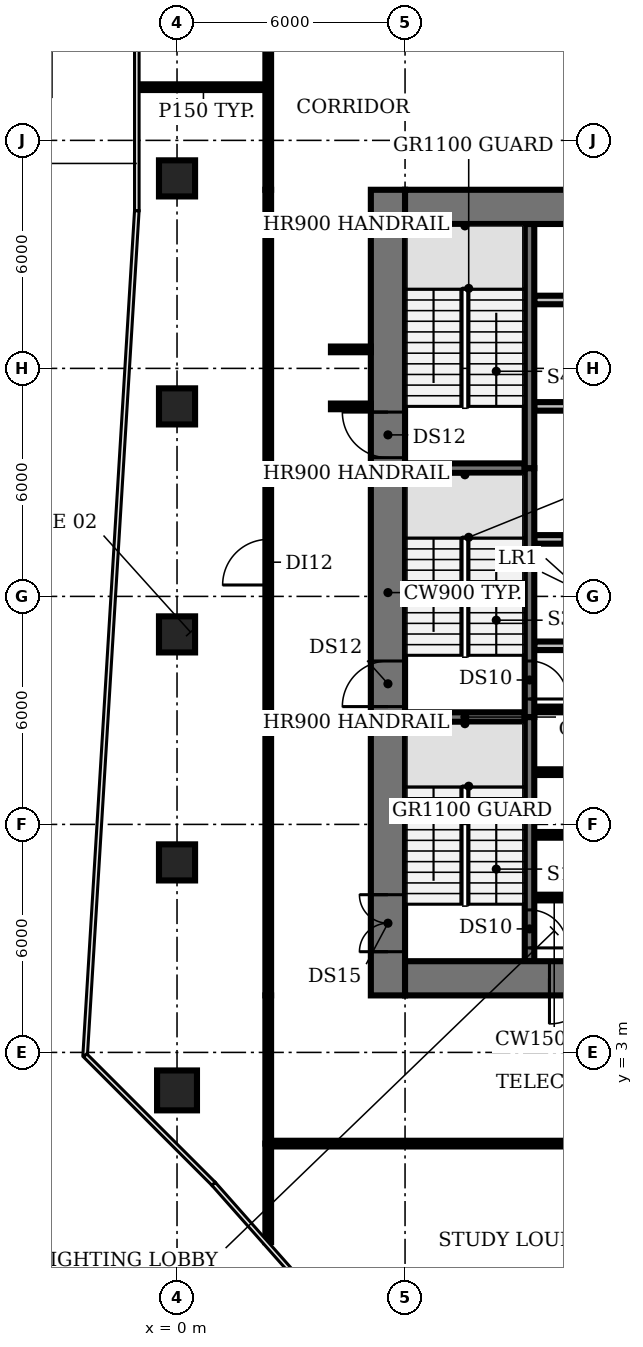
"""IFC4 building model, lengths in metres.
Left out: names, types, materials, properties, quantities, classifications, styles, units other than length and angle.
Written with IfcOpenShell. Run it as: python <this file> out.ifc"""

import sys

from ifc_helpers import new_model, si_unit, direction, frame, frame_2d, origin, origin_2d, place, context, subcontext, project, spatial, rectangle, circle, extrude, element, fill, save


model = new_model("IFC4")
c1 = context("Model", 3, precision=1e-05, world=origin(), true_north=direction((0.0, 1.0)))
c2 = subcontext(c1, "Body", "Model", "MODEL_VIEW")
j1 = project(units=[si_unit("LENGTHUNIT", "METRE"), si_unit("PLANEANGLEUNIT", "RADIAN")], contexts=[c1])
p1 = place(None, origin())
s1 = spatial("IfcSite", under=j1, at=p1, CompositionType="ELEMENT")
p2 = place(p1, origin())
s2 = spatial("IfcBuilding", under=s1, at=p2, CompositionType="ELEMENT")
p3 = place(p2, frame((0.0, 0.0, 37.4)))
s3 = spatial("IfcBuildingStorey", under=s2, at=p3, CompositionType="ELEMENT", Elevation=37.4)
p4 = place(p3, frame((0.0, 2.0, 0.0), z_axis=(0.0, 0.0, 1.0), x_axis=(1.0, 0.0, 0.0)))
e1 = element("IfcColumn", 1, at=p4, inside=s3, PredefinedType="COLUMN", context=c2, shape_type="SweptSolid", body=[
    extrude(circle(Radius=0.525, at=origin_2d()), origin(), (0.0, 0.0, 1.0), 3.85),
])
for number, where, z_axis, x_axis in (
    (2, (0.0, 8.0, 0.0), (0.0, 0.0, 1.0), (1.0, 0.0, 0.0)),
    (3, (0.0, 14.0, 0.0), (0.0, 0.0, 1.0), (1.0, 0.0, 0.0)),
    (4, (0.0, 20.0, 0.0), (0.0, 0.0, 1.0), (1.0, 0.0, 0.0)),
    (5, (0.0, 26.0, 0.0), (0.0, 0.0, 1.0), (1.0, 0.0, 0.0)),
):
    element("IfcColumn", number, at=place(p3, frame(where, z_axis=z_axis, x_axis=x_axis)), inside=s3, PredefinedType="COLUMN", context=c2, shape_type="SweptSolid", body=[
        extrude(rectangle(XDim=0.95, YDim=0.95, at=origin_2d()), origin(), (0.0, 0.0, 1.0), 3.85),
    ])
for number, where, z_axis, x_axis in (
    (6, (9.4, 7.075, 0.0), (0.0, 0.0, 1.0), (1.0, 0.0, 0.0)),
    (7, (9.4, 8.725, 0.0), (0.0, 0.0, 1.0), (1.0, 0.0, 0.0)),
    (8, (9.4, 10.375, 0.0), (0.0, 0.0, 1.0), (1.0, 0.0, 0.0)),
):
    element("IfcWall", number, at=place(p3, frame(where, z_axis=z_axis, x_axis=x_axis)), inside=s3, PredefinedType="SHEAR", context=c2, shape_type="SweptSolid", body=[
        extrude(rectangle(XDim=1.05, YDim=0.15, at=frame_2d((0.525, 0.0))), origin(), (0.0, 0.0, 1.0), 3.85),
    ])
p5 = place(p3, frame((6.0, 11.825, 0.0), z_axis=(0.0, 0.0, 1.0), x_axis=(1.0, 0.0, 0.0)))
e9 = element("IfcWall", 9, at=p5, inside=s3, PredefinedType="SHEAR", context=c2, shape_type="SweptSolid", body=[
    extrude(rectangle(XDim=3.15, YDim=0.25, at=frame_2d((1.575, 0.0))), origin(), (0.0, 0.0, 1.0), 3.85),
])
p6 = place(p3, frame((9.4, 12.025, 0.0), z_axis=(0.0, 0.0, 1.0), x_axis=(1.0, 0.0, 0.0)))
e10 = element("IfcWall", 10, at=p6, inside=s3, PredefinedType="SHEAR", context=c2, shape_type="SweptSolid", body=[
    extrude(rectangle(XDim=1.05, YDim=0.15, at=frame_2d((0.525, 0.0))), origin(), (0.0, 0.0, 1.0), 3.85),
])
p7 = place(p3, frame((9.4, 13.7, 0.0), z_axis=(0.0, 0.0, 1.0), x_axis=(1.0, 0.0, 0.0)))
e11 = element("IfcWall", 11, at=p7, inside=s3, PredefinedType="PARTITIONING", context=c2, shape_type="SweptSolid", body=[
    extrude(rectangle(XDim=4.0, YDim=0.225, at=frame_2d((2.0, 0.0))), origin(), (0.0, 0.0, 1.0), 3.85),
])
p8 = place(p3, frame((9.4, 16.5, 0.0), z_axis=(0.0, 0.0, 1.0), x_axis=(1.0, 0.0, 0.0)))
e12 = element("IfcWall", 12, at=p8, inside=s3, PredefinedType="PARTITIONING", context=c2, shape_type="SweptSolid", body=[
    extrude(rectangle(XDim=14.6, YDim=0.225, at=frame_2d((7.3, 0.0))), origin(), (0.0, 0.0, 1.0), 3.85),
])
p9 = place(p8, frame((0.75, 0.0, 0.0)))
e13 = element("IfcOpeningElement", 13, at=p9, cuts=e12, PredefinedType="OPENING", context=c2, shape_type="SweptSolid", body=[
    extrude(rectangle(XDim=1.1, YDim=2.1, at=frame_2d((0.55, 1.05))), frame((0.0, 0.123, 0.0), z_axis=(0.0, -1.0, 0.0), x_axis=(1.0, 0.0, 0.0)), (0.0, 0.0, 1.0), 0.245),
])
p10 = place(p8, frame((3.55, 0.0, 0.0)))
e14 = element("IfcOpeningElement", 14, at=p10, cuts=e12, PredefinedType="OPENING", context=c2, shape_type="SweptSolid", body=[
    extrude(rectangle(XDim=1.1, YDim=2.1, at=frame_2d((0.55, 1.05))), frame((0.0, 0.123, 0.0), z_axis=(0.0, -1.0, 0.0), x_axis=(1.0, 0.0, 0.0)), (0.0, 0.0, 1.0), 0.245),
])
p11 = place(p8, frame((6.35, 0.0, 0.0)))
e15 = element("IfcOpeningElement", 15, at=p11, cuts=e12, PredefinedType="OPENING", context=c2, shape_type="SweptSolid", body=[
    extrude(rectangle(XDim=1.1, YDim=2.1, at=frame_2d((0.55, 1.05))), frame((0.0, 0.123, 0.0), z_axis=(0.0, -1.0, 0.0), x_axis=(1.0, 0.0, 0.0)), (0.0, 0.0, 1.0), 0.245),
])
p12 = place(p8, frame((9.15, 0.0, 0.0)))
e16 = element("IfcOpeningElement", 16, at=p12, cuts=e12, PredefinedType="OPENING", context=c2, shape_type="SweptSolid", body=[
    extrude(rectangle(XDim=1.1, YDim=2.1, at=frame_2d((0.55, 1.05))), frame((0.0, 0.123, 0.0), z_axis=(0.0, -1.0, 0.0), x_axis=(1.0, 0.0, 0.0)), (0.0, 0.0, 1.0), 0.245),
])
p13 = place(p8, frame((11.308, 0.0, 0.0)))
e17 = element("IfcOpeningElement", 17, at=p13, cuts=e12, PredefinedType="OPENING", context=c2, shape_type="SweptSolid", body=[
    extrude(rectangle(XDim=0.9, YDim=2.1, at=frame_2d((0.45, 1.05))), frame((0.0, 0.123, 0.0), z_axis=(0.0, -1.0, 0.0), x_axis=(1.0, 0.0, 0.0)), (0.0, 0.0, 1.0), 0.245),
])
p14 = place(p8, frame((13.083, 0.0, 0.0)))
e18 = element("IfcOpeningElement", 18, at=p14, cuts=e12, PredefinedType="OPENING", context=c2, shape_type="SweptSolid", body=[
    extrude(rectangle(XDim=0.9, YDim=2.1, at=frame_2d((0.45, 1.05))), frame((0.0, 0.123, 0.0), z_axis=(0.0, -1.0, 0.0), x_axis=(1.0, 0.0, 0.0)), (0.0, 0.0, 1.0), 0.245),
])
p15 = place(p3, frame((6.0, 18.375, 0.0), z_axis=(0.0, 0.0, 1.0), x_axis=(1.0, 0.0, 0.0)))
e19 = element("IfcWall", 19, at=p15, inside=s3, PredefinedType="SHEAR", context=c2, shape_type="SweptSolid", body=[
    extrude(rectangle(XDim=3.15, YDim=0.25, at=frame_2d((1.575, 0.0))), origin(), (0.0, 0.0, 1.0), 3.85),
])
p16 = place(p3, frame((24.0, 20.0, 0.0), z_axis=(0.0, 0.0, 1.0), x_axis=(-1.0, 0.0, 0.0)))
e20 = element("IfcWall", 20, at=p16, inside=s3, PredefinedType="PARTITIONING", context=c2, shape_type="SweptSolid", body=[
    extrude(rectangle(XDim=14.6, YDim=0.225, at=frame_2d((7.3, 0.0))), origin(), (0.0, 0.0, 1.0), 3.85),
])
p17 = place(p16, frame((11.35, 0.0, 0.0)))
e21 = element("IfcOpeningElement", 21, at=p17, cuts=e20, PredefinedType="OPENING", context=c2, shape_type="SweptSolid", body=[
    extrude(rectangle(XDim=1.0, YDim=2.1, at=frame_2d((0.5, 1.05))), frame((0.0, 0.123, 0.0), z_axis=(0.0, -1.0, 0.0), x_axis=(1.0, 0.0, 0.0)), (0.0, 0.0, 1.0), 0.245),
])
p18 = place(p16, frame((5.775, 0.0, 0.0)))
e22 = element("IfcOpeningElement", 22, at=p18, cuts=e20, PredefinedType="OPENING", context=c2, shape_type="SweptSolid", body=[
    extrude(rectangle(XDim=1.0, YDim=2.1, at=frame_2d((0.5, 1.05))), frame((0.0, 0.123, 0.0), z_axis=(0.0, -1.0, 0.0), x_axis=(1.0, 0.0, 0.0)), (0.0, 0.0, 1.0), 0.245),
])
p19 = place(p16, frame((2.308, 0.0, 0.0)))
e23 = element("IfcOpeningElement", 23, at=p19, cuts=e20, PredefinedType="OPENING", context=c2, shape_type="SweptSolid", body=[
    extrude(rectangle(XDim=0.9, YDim=2.1, at=frame_2d((0.45, 1.05))), frame((0.0, 0.123, 0.0), z_axis=(0.0, -1.0, 0.0), x_axis=(1.0, 0.0, 0.0)), (0.0, 0.0, 1.0), 0.245),
])
p20 = place(p16, frame((0.532, 0.0, 0.0)))
e24 = element("IfcOpeningElement", 24, at=p20, cuts=e20, PredefinedType="OPENING", context=c2, shape_type="SweptSolid", body=[
    extrude(rectangle(XDim=0.9, YDim=2.1, at=frame_2d((0.45, 1.05))), frame((0.0, 0.123, 0.0), z_axis=(0.0, -1.0, 0.0), x_axis=(1.0, 0.0, 0.0)), (0.0, 0.0, 1.0), 0.245),
])
p21 = place(p3, frame((9.4, 22.8, 0.0), z_axis=(0.0, 0.0, 1.0), x_axis=(1.0, 0.0, 0.0)))
e25 = element("IfcWall", 25, at=p21, inside=s3, PredefinedType="PARTITIONING", context=c2, shape_type="SweptSolid", body=[
    extrude(rectangle(XDim=14.6, YDim=0.225, at=frame_2d((7.3, 0.0))), origin(), (0.0, 0.0, 1.0), 3.85),
])
p22 = place(p3, frame((9.275, 11.825, 0.0), z_axis=(0.0, 0.0, 1.0), x_axis=(0.0, -1.0, 0.0)))
e26 = element("IfcWall", 26, at=p22, inside=s3, PredefinedType="SHEAR", context=c2, shape_type="SweptSolid", body=[
    extrude(rectangle(XDim=6.425, YDim=0.25, at=frame_2d((3.212, 0.0))), origin(), (0.0, 0.0, 1.0), 3.85),
])
p23 = place(p22, frame((5.075, 0.0, 0.0)))
e27 = element("IfcOpeningElement", 27, at=p23, cuts=e26, PredefinedType="OPENING", context=c2, shape_type="SweptSolid", body=[
    extrude(rectangle(XDim=1.0, YDim=2.1, at=frame_2d((0.5, 1.05))), frame((0.0, 0.135, 0.0), z_axis=(0.0, -1.0, 0.0), x_axis=(1.0, 0.0, 0.0)), (0.0, 0.0, 1.0), 0.27),
])
p24 = place(p3, frame((9.275, 18.375, 0.0), z_axis=(0.0, 0.0, 1.0), x_axis=(0.0, -1.0, 0.0)))
e28 = element("IfcWall", 28, at=p24, inside=s3, PredefinedType="SHEAR", context=c2, shape_type="SweptSolid", body=[
    extrude(rectangle(XDim=6.55, YDim=0.25, at=frame_2d((3.275, 0.0))), origin(), (0.0, 0.0, 1.0), 3.85),
])
p25 = place(p24, frame((5.075, 0.0, 0.0)))
e29 = element("IfcOpeningElement", 29, at=p25, cuts=e28, PredefinedType="OPENING", context=c2, shape_type="SweptSolid", body=[
    extrude(rectangle(XDim=1.0, YDim=2.1, at=frame_2d((0.5, 1.05))), frame((0.0, 0.135, 0.0), z_axis=(0.0, -1.0, 0.0), x_axis=(1.0, 0.0, 0.0)), (0.0, 0.0, 1.0), 0.27),
])
p26 = place(p3, frame((9.275, 18.375, 0.0), z_axis=(0.0, 0.0, 1.0), x_axis=(0.0, 1.0, 0.0)))
e30 = element("IfcWall", 30, at=p26, inside=s3, PredefinedType="SHEAR", context=c2, shape_type="SweptSolid", body=[
    extrude(rectangle(XDim=6.425, YDim=0.25, at=frame_2d((3.212, 0.0))), origin(), (0.0, 0.0, 1.0), 3.85),
])
p27 = place(p3, frame((5.55, 4.5, 0.0), z_axis=(0.0, 0.0, 1.0), x_axis=(0.0, 1.0, 0.0)))
e31 = element("IfcWall", 31, at=p27, inside=s3, PredefinedType="SHEAR", context=c2, shape_type="SweptSolid", body=[
    extrude(rectangle(XDim=21.2, YDim=0.9, at=frame_2d((10.6, 0.0))), origin(), (0.0, 0.0, 1.0), 3.85),
])
p28 = place(p27, frame((1.15, 0.0, 0.0)))
e32 = element("IfcOpeningElement", 32, at=p28, cuts=e31, PredefinedType="OPENING", context=c2, shape_type="SweptSolid", body=[
    extrude(rectangle(XDim=1.5, YDim=2.1, at=frame_2d((0.75, 1.05))), frame((0.0, 0.46, 0.0), z_axis=(0.0, -1.0, 0.0), x_axis=(1.0, 0.0, 0.0)), (0.0, 0.0, 1.0), 0.92),
])
p29 = place(p27, frame((7.6, 0.0, 0.0)))
e33 = element("IfcOpeningElement", 33, at=p29, cuts=e31, PredefinedType="OPENING", context=c2, shape_type="SweptSolid", body=[
    extrude(rectangle(XDim=1.2, YDim=2.1, at=frame_2d((0.6, 1.05))), frame((0.0, 0.46, 0.0), z_axis=(0.0, -1.0, 0.0), x_axis=(1.0, 0.0, 0.0)), (0.0, 0.0, 1.0), 0.92),
])
p30 = place(p27, frame((14.15, 0.0, 0.0)))
e34 = element("IfcOpeningElement", 34, at=p30, cuts=e31, PredefinedType="OPENING", context=c2, shape_type="SweptSolid", body=[
    extrude(rectangle(XDim=1.2, YDim=2.1, at=frame_2d((0.6, 1.05))), frame((0.0, 0.46, 0.0), z_axis=(0.0, -1.0, 0.0), x_axis=(1.0, 0.0, 0.0)), (0.0, 0.0, 1.0), 0.92),
])
p31 = place(p3, frame((24.0, 4.95, 0.0), z_axis=(0.0, 0.0, 1.0), x_axis=(-1.0, 0.0, 0.0)))
e35 = element("IfcWall", 35, at=p31, inside=s3, PredefinedType="SHEAR", context=c2, shape_type="SweptSolid", body=[
    extrude(rectangle(XDim=18.0, YDim=0.9, at=frame_2d((9.0, 0.0))), origin(), (0.0, 0.0, 1.0), 3.85),
])
p32 = place(p31, frame((13.0, 0.0, 0.0)))
e36 = element("IfcOpeningElement", 36, at=p32, cuts=e35, PredefinedType="OPENING", context=c2, shape_type="SweptSolid", body=[
    extrude(rectangle(XDim=1.2, YDim=2.1, at=frame_2d((0.6, 1.05))), frame((0.0, 0.46, 0.0), z_axis=(0.0, -1.0, 0.0), x_axis=(1.0, 0.0, 0.0)), (0.0, 0.0, 1.0), 0.92),
])
p33 = place(p31, frame((4.9, 0.0, 0.0)))
e37 = element("IfcOpeningElement", 37, at=p33, cuts=e35, PredefinedType="OPENING", context=c2, shape_type="SweptSolid", body=[
    extrude(rectangle(XDim=1.0, YDim=2.1, at=frame_2d((0.5, 1.05))), frame((0.0, 0.46, 0.0), z_axis=(0.0, -1.0, 0.0), x_axis=(1.0, 0.0, 0.0)), (0.0, 0.0, 1.0), 0.92),
])
p34 = place(p3, frame((6.0, 25.25, 0.0), z_axis=(0.0, 0.0, 1.0), x_axis=(1.0, 0.0, 0.0)))
e38 = element("IfcWall", 38, at=p34, inside=s3, PredefinedType="SHEAR", context=c2, shape_type="SweptSolid", body=[
    extrude(rectangle(XDim=18.0, YDim=0.9, at=frame_2d((9.0, 0.0))), origin(), (0.0, 0.0, 1.0), 3.85),
])
p35 = place(p3, frame((-1.01, 28.4, 0.0), z_axis=(0.0, 0.0, 1.0), x_axis=(1.0, 0.0, 0.0)))
e39 = element("IfcWall", 39, at=p35, inside=s3, PredefinedType="PARTITIONING", context=c2, shape_type="SweptSolid", body=[
    extrude(rectangle(XDim=3.41, YDim=0.15, at=frame_2d((1.705, 0.0))), origin(), (0.0, 0.0, 1.0), 2.83),
])
p36 = place(p3, frame((2.4, -1.993, 0.0), z_axis=(0.0, 0.0, 1.0), x_axis=(0.0, 1.0, 0.0)))
e40 = element("IfcWall", 40, at=p36, inside=s3, PredefinedType="PARTITIONING", context=c2, shape_type="SweptSolid", body=[
    extrude(rectangle(XDim=2.593, YDim=0.15, at=frame_2d((1.296, 0.0))), origin(), (0.0, 0.0, 1.0), 2.83),
])
p37 = place(p3, frame((2.4, 0.6, 0.0), z_axis=(0.0, 0.0, 1.0), x_axis=(0.0, 1.0, 0.0)))
e41 = element("IfcWall", 41, at=p37, inside=s3, PredefinedType="PARTITIONING", context=c2, shape_type="SweptSolid", body=[
    extrude(rectangle(XDim=3.9, YDim=0.15, at=frame_2d((1.95, 0.0))), origin(), (0.0, 0.0, 1.0), 2.83),
])
p38 = place(p3, frame((2.4, 4.5, 0.0), z_axis=(0.0, 0.0, 1.0), x_axis=(0.0, 1.0, 0.0)))
e42 = element("IfcWall", 42, at=p38, inside=s3, PredefinedType="PARTITIONING", context=c2, shape_type="SweptSolid", body=[
    extrude(rectangle(XDim=21.2, YDim=0.15, at=frame_2d((10.6, 0.0))), origin(), (0.0, 0.0, 1.0), 2.83),
])
p39 = place(p38, frame((10.8, 0.0, 0.0)))
e43 = element("IfcOpeningElement", 43, at=p39, cuts=e42, PredefinedType="OPENING", context=c2, shape_type="SweptSolid", body=[
    extrude(rectangle(XDim=1.2, YDim=2.1, at=frame_2d((0.6, 1.05))), frame((0.0, 0.085, 0.0), z_axis=(0.0, -1.0, 0.0), x_axis=(1.0, 0.0, 0.0)), (0.0, 0.0, 1.0), 0.17),
])
p40 = place(p3, frame((2.4, 25.7, 0.0), z_axis=(0.0, 0.0, 1.0), x_axis=(0.0, 1.0, 0.0)))
e44 = element("IfcWall", 44, at=p40, inside=s3, PredefinedType="PARTITIONING", context=c2, shape_type="SweptSolid", body=[
    extrude(rectangle(XDim=3.9, YDim=0.15, at=frame_2d((1.95, 0.0))), origin(), (0.0, 0.0, 1.0), 2.83),
])
for number, where, z_axis, x_axis in (
    (45, (4.05, 20.0, 0.0), (0.0, 0.0, 1.0), (1.0, 0.0, 0.0)),
    (46, (4.05, 21.5, 0.0), (0.0, 0.0, 1.0), (1.0, 0.0, 0.0)),
):
    element("IfcWall", number, at=place(p3, frame(where, z_axis=z_axis, x_axis=x_axis)), inside=s3, PredefinedType="PARTITIONING", context=c2, shape_type="SweptSolid", body=[
        extrude(rectangle(XDim=1.05, YDim=0.15, at=frame_2d((0.525, 0.0))), origin(), (0.0, 0.0, 1.0), 2.83),
    ])
p41 = place(p3, frame((27.6, 0.6, 0.0), z_axis=(0.0, 0.0, 1.0), x_axis=(-1.0, 0.0, 0.0)))
e47 = element("IfcWall", 47, at=p41, inside=s3, PredefinedType="PARTITIONING", context=c2, shape_type="SweptSolid", body=[
    extrude(rectangle(XDim=25.2, YDim=0.15, at=frame_2d((12.6, 0.0))), origin(), (0.0, 0.0, 1.0), 2.83),
])
p42 = place(p41, frame((12.1, 0.0, 0.0)))
e48 = element("IfcOpeningElement", 48, at=p42, cuts=e47, PredefinedType="OPENING", context=c2, shape_type="SweptSolid", body=[
    extrude(rectangle(XDim=1.2, YDim=2.1, at=frame_2d((0.6, 1.05))), frame((0.0, 0.085, 0.0), z_axis=(0.0, -1.0, 0.0), x_axis=(1.0, 0.0, 0.0)), (0.0, 0.0, 1.0), 0.17),
])
p43 = place(p23, origin())
e49 = element("IfcDoor", 49, at=p43, inside=s3, OperationType="SINGLE_SWING_RIGHT", PredefinedType="DOOR", context=c2, shape_type="SweptSolid", body=[
    extrude(rectangle(XDim=1.0, YDim=2.1, at=frame_2d((0.5, 1.05))), frame((0.0, 0.025, 0.0), z_axis=(0.0, -1.0, 0.0), x_axis=(1.0, 0.0, 0.0)), (0.0, 0.0, 1.0), 0.05),
])
fill(e27, e49)
p44 = place(p25, origin())
e50 = element("IfcDoor", 50, at=p44, inside=s3, OperationType="SINGLE_SWING_RIGHT", PredefinedType="DOOR", context=c2, shape_type="SweptSolid", body=[
    extrude(rectangle(XDim=1.0, YDim=2.1, at=frame_2d((0.5, 1.05))), frame((0.0, 0.025, 0.0), z_axis=(0.0, -1.0, 0.0), x_axis=(1.0, 0.0, 0.0)), (0.0, 0.0, 1.0), 0.05),
])
fill(e29, e50)
p45 = place(p28, origin())
e51 = element("IfcDoor", 51, at=p45, inside=s3, OperationType="DOUBLE_DOOR_SINGLE_SWING", PredefinedType="DOOR", context=c2, shape_type="SweptSolid", body=[
    extrude(rectangle(XDim=1.5, YDim=2.1, at=frame_2d((0.75, 1.05))), frame((0.0, 0.025, 0.0), z_axis=(0.0, -1.0, 0.0), x_axis=(1.0, 0.0, 0.0)), (0.0, 0.0, 1.0), 0.05),
])
fill(e32, e51)
p46 = place(p29, origin())
e52 = element("IfcDoor", 52, at=p46, inside=s3, OperationType="SINGLE_SWING_LEFT", PredefinedType="DOOR", context=c2, shape_type="SweptSolid", body=[
    extrude(rectangle(XDim=1.2, YDim=2.1, at=frame_2d((0.6, 1.05))), frame((0.0, 0.025, 0.0), z_axis=(0.0, -1.0, 0.0), x_axis=(1.0, 0.0, 0.0)), (0.0, 0.0, 1.0), 0.05),
])
fill(e33, e52)
p47 = place(p30, origin())
e53 = element("IfcDoor", 53, at=p47, inside=s3, OperationType="SINGLE_SWING_RIGHT", PredefinedType="DOOR", context=c2, shape_type="SweptSolid", body=[
    extrude(rectangle(XDim=1.2, YDim=2.1, at=frame_2d((0.6, 1.05))), frame((0.0, 0.025, 0.0), z_axis=(0.0, -1.0, 0.0), x_axis=(1.0, 0.0, 0.0)), (0.0, 0.0, 1.0), 0.05),
])
fill(e34, e53)
p48 = place(p32, origin())
e54 = element("IfcDoor", 54, at=p48, inside=s3, OperationType="SINGLE_SWING_RIGHT", PredefinedType="DOOR", context=c2, shape_type="SweptSolid", body=[
    extrude(rectangle(XDim=1.2, YDim=2.1, at=frame_2d((0.6, 1.05))), frame((0.0, 0.025, 0.0), z_axis=(0.0, -1.0, 0.0), x_axis=(1.0, 0.0, 0.0)), (0.0, 0.0, 1.0), 0.05),
])
fill(e36, e54)
p49 = place(p39, origin())
e55 = element("IfcDoor", 55, at=p49, inside=s3, OperationType="SINGLE_SWING_LEFT", PredefinedType="DOOR", context=c2, shape_type="SweptSolid", body=[
    extrude(rectangle(XDim=1.2, YDim=2.1, at=frame_2d((0.6, 1.05))), frame((0.0, 0.025, 0.0), z_axis=(0.0, -1.0, 0.0), x_axis=(1.0, 0.0, 0.0)), (0.0, 0.0, 1.0), 0.05),
])
fill(e43, e55)
save(model, sys.argv[1])
